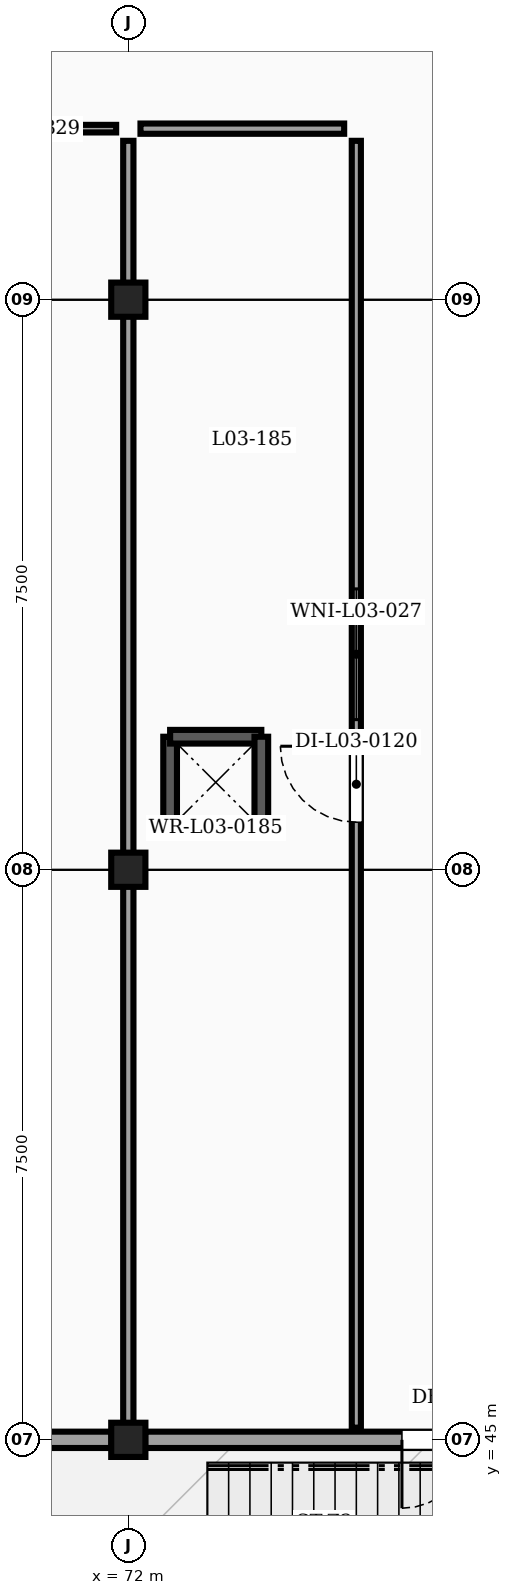
"""IFC4 building model, lengths in metres.
Left out: names, types, materials, properties, quantities, classifications, styles, units other than length and angle.
Written with IfcOpenShell. Run it as: python <this file> out.ifc"""

import sys

from ifc_helpers import new_model, si_unit, direction, frame, frame_2d, origin, origin_2d, place, context, subcontext, project, spatial, rectangle, extrude, element, fill, save


model = new_model("IFC4")
c1 = context("Model", 3, precision=1e-05, world=origin(), true_north=direction((0.0, 1.0)))
c2 = subcontext(c1, "Body", "Model", "MODEL_VIEW")
j1 = project(units=[si_unit("LENGTHUNIT", "METRE"), si_unit("PLANEANGLEUNIT", "RADIAN")], contexts=[c1])
p1 = place(None, origin())
s1 = spatial("IfcSite", under=j1, at=p1, CompositionType="ELEMENT")
p2 = place(p1, origin())
s2 = spatial("IfcBuilding", under=s1, at=p2, CompositionType="ELEMENT")
p3 = place(p2, frame((0.0, 0.0, 12.3)))
s3 = spatial("IfcBuildingStorey", under=s2, at=p3, CompositionType="ELEMENT", Elevation=12.3)
for number, where, z_axis, x_axis in (
    (1, (72.0, 45.0, 0.0), (0.0, 0.0, 1.0), (1.0, 0.0, 0.0)),
    (2, (72.0, 52.5, 0.0), (0.0, 0.0, 1.0), (1.0, 0.0, 0.0)),
    (3, (72.0, 60.0, 0.0), (0.0, 0.0, 1.0), (1.0, 0.0, 0.0)),
):
    element("IfcColumn", number, at=place(p3, frame(where, z_axis=z_axis, x_axis=x_axis)), inside=s3, PredefinedType="COLUMN", context=c2, shape_type="SweptSolid", body=[
        extrude(rectangle(XDim=0.45, YDim=0.45, at=origin_2d()), origin(), (0.0, 0.0, 1.0), 3.8),
    ])
p4 = place(p3, frame((80.779, 45.0, 0.0), z_axis=(0.0, 0.0, 1.0), x_axis=(-1.0, 0.0, 0.0)))
e4 = element("IfcWall", 4, at=p4, inside=s3, PredefinedType="SOLIDWALL", context=c2, shape_type="SweptSolid", body=[
    extrude(rectangle(XDim=8.558, YDim=0.215, at=frame_2d((4.279, 0.0))), origin(), (0.0, 0.0, 1.0), 3.047),
])
p5 = place(p4, frame((3.379, 0.0, 0.0)))
e5 = element("IfcOpeningElement", 5, at=p5, cuts=e4, PredefinedType="OPENING", context=c2, shape_type="SweptSolid", body=[
    extrude(rectangle(XDim=1.8, YDim=2.2, at=frame_2d((0.9, 1.1))), frame((0.0, 0.117, 0.0), z_axis=(0.0, -1.0, 0.0), x_axis=(1.0, 0.0, 0.0)), (0.0, 0.0, 1.0), 0.235),
])
p6 = place(p3, frame((71.779, 45.0, 0.0), z_axis=(0.0, 0.0, 1.0), x_axis=(-1.0, 0.0, 0.0)))
e6 = element("IfcWall", 6, at=p6, inside=s3, PredefinedType="SOLIDWALL", context=c2, shape_type="SweptSolid", body=[
    extrude(rectangle(XDim=8.558, YDim=0.215, at=frame_2d((4.279, 0.0))), origin(), (0.0, 0.0, 1.0), 2.997),
])
p7 = place(p6, frame((3.529, 0.0, 0.0)))
e7 = element("IfcOpeningElement", 7, at=p7, cuts=e6, PredefinedType="OPENING", context=c2, shape_type="SweptSolid", body=[
    extrude(rectangle(XDim=1.5, YDim=2.15, at=frame_2d((0.75, 1.075))), frame((0.0, 0.117, 0.0), z_axis=(0.0, -1.0, 0.0), x_axis=(1.0, 0.0, 0.0)), (0.0, 0.0, 1.0), 0.235),
])
for number, where, z_axis, x_axis in (
    (8, (73.75, 53.05, 0.0), (0.0, 0.0, 1.0), (-1.0, 0.0, 0.0)),
    (9, (72.55, 53.05, 0.0), (0.0, 0.0, 1.0), (0.0, 1.0, 0.0)),
    (10, (72.55, 54.25, 0.0), (0.0, 0.0, 1.0), (1.0, 0.0, 0.0)),
    (11, (73.75, 54.25, 0.0), (0.0, 0.0, 1.0), (0.0, -1.0, 0.0)),
):
    element("IfcWall", number, at=place(p3, frame(where, z_axis=z_axis, x_axis=x_axis)), inside=s3, PredefinedType="SHEAR", context=c2, shape_type="SweptSolid", body=[
        extrude(rectangle(XDim=1.2, YDim=0.18, at=frame_2d((0.6, 0.0))), origin(), (0.0, 0.0, 1.0), 3.59),
    ])
p8 = place(p3, frame((71.84, 62.25, 0.0), z_axis=(0.0, 0.0, 1.0), x_axis=(-1.0, 0.0, 0.0)))
e12 = element("IfcWall", 12, at=p8, inside=s3, PredefinedType="PARTITIONING", context=c2, shape_type="SweptSolid", body=[
    extrude(rectangle(XDim=2.68, YDim=0.1, at=frame_2d((1.34, 0.0))), origin(), (0.0, 0.0, 1.0), 3.59),
])
p9 = place(p3, frame((75.0, 45.16, 0.0), z_axis=(0.0, 0.0, 1.0), x_axis=(0.0, 1.0, 0.0)))
e13 = element("IfcWall", 13, at=p9, inside=s3, PredefinedType="PARTITIONING", context=c2, shape_type="SweptSolid", body=[
    extrude(rectangle(XDim=16.93, YDim=0.12, at=frame_2d((8.465, 0.0))), origin(), (0.0, 0.0, 1.0), 3.222),
])
p10 = place(p9, frame((7.965, 0.0, 0.0)))
e14 = element("IfcOpeningElement", 14, at=p10, cuts=e13, PredefinedType="OPENING", context=c2, shape_type="SweptSolid", body=[
    extrude(rectangle(XDim=1.0, YDim=2.15, at=frame_2d((0.5, 1.075))), frame((0.0, 0.07, 0.0), z_axis=(0.0, -1.0, 0.0), x_axis=(1.0, 0.0, 0.0)), (0.0, 0.0, 1.0), 0.14),
])
p11 = place(p9, frame((9.315, 0.0, 1.02)))
e15 = element("IfcOpeningElement", 15, at=p11, cuts=e13, PredefinedType="OPENING", context=c2, shape_type="SweptSolid", body=[
    extrude(rectangle(XDim=1.72, YDim=1.22, at=frame_2d((0.86, 0.61))), frame((0.0, 0.07, 0.0), z_axis=(0.0, -1.0, 0.0), x_axis=(1.0, 0.0, 0.0)), (0.0, 0.0, 1.0), 0.14),
])
p12 = place(p3, frame((74.84, 62.25, 0.0), z_axis=(0.0, 0.0, 1.0), x_axis=(-1.0, 0.0, 0.0)))
e16 = element("IfcWall", 16, at=p12, inside=s3, PredefinedType="PARTITIONING", context=c2, shape_type="SweptSolid", body=[
    extrude(rectangle(XDim=2.68, YDim=0.135, at=frame_2d((1.34, 0.0))), origin(), (0.0, 0.0, 1.0), 3.59),
])
p13 = place(p3, frame((72.0, 45.16, 0.0), z_axis=(0.0, 0.0, 1.0), x_axis=(0.0, 1.0, 0.0)))
e17 = element("IfcWall", 17, at=p13, inside=s3, PredefinedType="PARTITIONING", context=c2, shape_type="SweptSolid", body=[
    extrude(rectangle(XDim=16.93, YDim=0.135, at=frame_2d((8.465, 0.0))), origin(), (0.0, 0.0, 1.0), 2.862),
])
p14 = place(p5, origin())
e18 = element("IfcDoor", 18, at=p14, inside=s3, OperationType="DOUBLE_DOOR_SINGLE_SWING", PredefinedType="DOOR", context=c2, shape_type="SweptSolid", body=[
    extrude(rectangle(XDim=1.8, YDim=2.2, at=frame_2d((0.9, 1.1))), frame((0.0, 0.025, 0.0), z_axis=(0.0, -1.0, 0.0), x_axis=(1.0, 0.0, 0.0)), (0.0, 0.0, 1.0), 0.05),
])
fill(e5, e18)
p15 = place(p10, origin())
e19 = element("IfcDoor", 19, at=p15, inside=s3, OperationType="SINGLE_SWING_RIGHT", PredefinedType="DOOR", context=c2, shape_type="SweptSolid", body=[
    extrude(rectangle(XDim=1.0, YDim=2.15, at=frame_2d((0.5, 1.075))), frame((0.0, 0.025, 0.0), z_axis=(0.0, -1.0, 0.0), x_axis=(1.0, 0.0, 0.0)), (0.0, 0.0, 1.0), 0.05),
])
fill(e14, e19)
p16 = place(p11, origin())
e20 = element("IfcWindow", 20, at=p16, inside=s3, PartitioningType="DOUBLE_PANEL_VERTICAL", PredefinedType="WINDOW", context=c2, shape_type="SweptSolid", body=[
    extrude(rectangle(XDim=1.72, YDim=1.22, at=frame_2d((0.86, 0.61))), frame((0.0, 0.03, 0.0), z_axis=(0.0, -1.0, 0.0), x_axis=(1.0, 0.0, 0.0)), (0.0, 0.0, 1.0), 0.06),
])
fill(e15, e20)
save(model, sys.argv[1])
